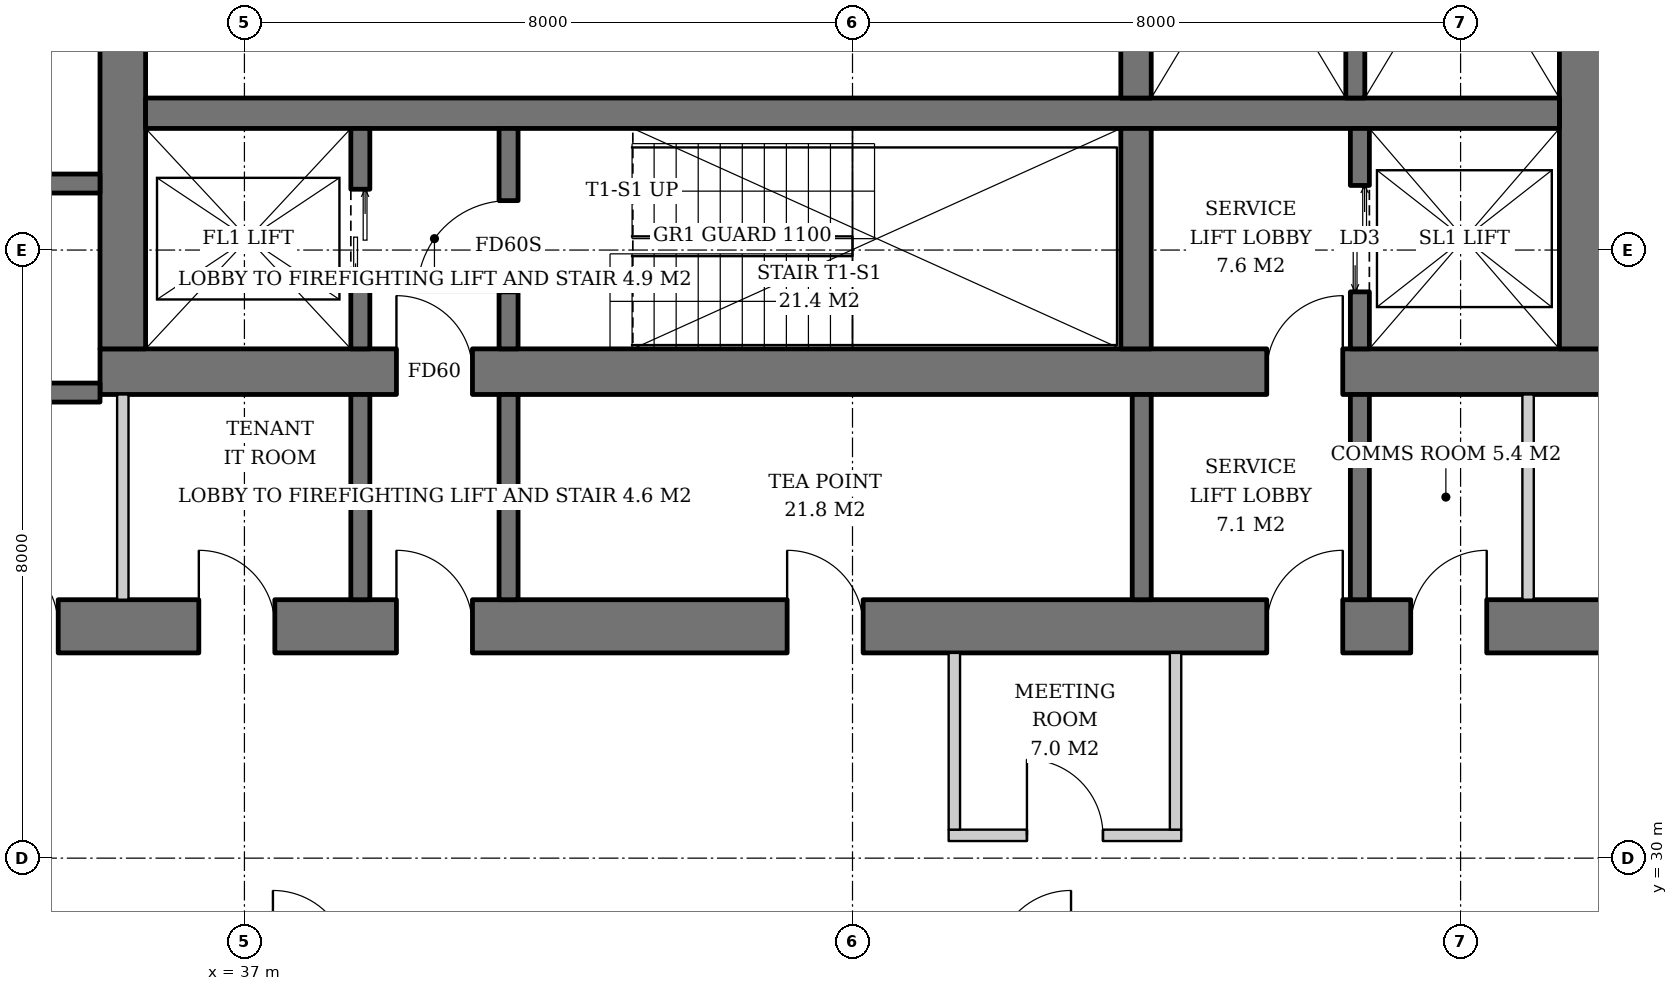
"""IFC4 building model, lengths in metres.
Left out: names, types, materials, properties, quantities, classifications, styles, units other than length and angle.
Written with IfcOpenShell. Run it as: python <this file> out.ifc"""

import sys

from ifc_helpers import new_model, si_unit, direction, frame, frame_2d, origin, place, context, subcontext, project, spatial, rectangle, extrude, element, fill, save


model = new_model("IFC4")
c1 = context("Model", 3, precision=1e-05, world=origin(), true_north=direction((0.0, 1.0)))
c2 = subcontext(c1, "Body", "Model", "MODEL_VIEW")
j1 = project(units=[si_unit("LENGTHUNIT", "METRE"), si_unit("PLANEANGLEUNIT", "RADIAN")], contexts=[c1])
p1 = place(None, origin())
s1 = spatial("IfcSite", under=j1, at=p1, CompositionType="ELEMENT")
p2 = place(p1, origin())
s2 = spatial("IfcBuilding", under=s1, at=p2, CompositionType="ELEMENT")
p3 = place(p2, frame((0.0, 0.0, 112.2)))
s3 = spatial("IfcBuildingStorey", under=s2, at=p3, CompositionType="ELEMENT", Elevation=112.2)
p4 = place(p3, frame((35.1, 36.4, 0.0), z_axis=(0.0, 0.0, 1.0), x_axis=(1.0, 0.0, 0.0)))
e1 = element("IfcWall", 1, at=p4, inside=s3, PredefinedType="SHEAR", context=c2, shape_type="SweptSolid", body=[
    extrude(rectangle(XDim=19.8, YDim=0.6, at=frame_2d((9.9, 0.0))), origin(), (0.0, 0.0, 1.0), 3.8),
])
p5 = place(p4, frame((3.9, 0.0, 0.0)))
e2 = element("IfcOpeningElement", 2, at=p5, cuts=e1, PredefinedType="OPENING", context=c2, shape_type="SweptSolid", body=[
    extrude(rectangle(XDim=1.0, YDim=2.1, at=frame_2d((0.5, 1.05))), frame((0.0, 0.31, 0.0), z_axis=(0.0, -1.0, 0.0), x_axis=(1.0, 0.0, 0.0)), (0.0, 0.0, 1.0), 0.62),
])
p6 = place(p4, frame((15.35, 0.0, 0.0)))
e3 = element("IfcOpeningElement", 3, at=p6, cuts=e1, PredefinedType="OPENING", context=c2, shape_type="SweptSolid", body=[
    extrude(rectangle(XDim=1.0, YDim=2.1, at=frame_2d((0.5, 1.05))), frame((0.0, 0.31, 0.0), z_axis=(0.0, -1.0, 0.0), x_axis=(1.0, 0.0, 0.0)), (0.0, 0.0, 1.0), 0.62),
])
p7 = place(p3, frame((35.4, 36.7, 0.0), z_axis=(0.0, 0.0, 1.0), x_axis=(0.0, 1.0, 0.0)))
e4 = element("IfcWall", 4, at=p7, inside=s3, PredefinedType="SHEAR", context=c2, shape_type="SweptSolid", body=[
    extrude(rectangle(XDim=18.6, YDim=0.6, at=frame_2d((9.3, 0.0))), origin(), (0.0, 0.0, 1.0), 3.8),
])
p8 = place(p7, frame((8.4, 0.0, 0.0)))
e5 = element("IfcOpeningElement", 5, at=p8, cuts=e4, PredefinedType="OPENING", context=c2, shape_type="SweptSolid", body=[
    extrude(rectangle(XDim=1.8, YDim=2.4, at=frame_2d((0.9, 1.2))), frame((0.0, 0.31, 0.0), z_axis=(0.0, -1.0, 0.0), x_axis=(1.0, 0.0, 0.0)), (0.0, 0.0, 1.0), 0.62),
])
p9 = place(p3, frame((54.6, 36.7, 0.0), z_axis=(0.0, 0.0, 1.0), x_axis=(0.0, 1.0, 0.0)))
e6 = element("IfcWall", 6, at=p9, inside=s3, PredefinedType="SHEAR", context=c2, shape_type="SweptSolid", body=[
    extrude(rectangle(XDim=18.6, YDim=0.6, at=frame_2d((9.3, 0.0))), origin(), (0.0, 0.0, 1.0), 3.8),
])
p10 = place(p9, frame((8.4, 0.0, 0.0)))
e7 = element("IfcOpeningElement", 7, at=p10, cuts=e6, PredefinedType="OPENING", context=c2, shape_type="SweptSolid", body=[
    extrude(rectangle(XDim=1.8, YDim=2.4, at=frame_2d((0.9, 1.2))), frame((0.0, 0.31, 0.0), z_axis=(0.0, -1.0, 0.0), x_axis=(1.0, 0.0, 0.0)), (0.0, 0.0, 1.0), 0.62),
])
p11 = place(p3, frame((31.7, 33.05, 0.0), z_axis=(0.0, 0.0, 1.0), x_axis=(1.0, 0.0, 0.0)))
e8 = element("IfcWall", 8, at=p11, inside=s3, PredefinedType="SHEAR", context=c2, shape_type="SweptSolid", body=[
    extrude(rectangle(XDim=26.6, YDim=0.7, at=frame_2d((13.3, 0.0))), origin(), (0.0, 0.0, 1.0), 3.8),
])
p12 = place(p11, frame((7.3, 0.0, 0.0)))
e9 = element("IfcOpeningElement", 9, at=p12, cuts=e8, PredefinedType="OPENING", context=c2, shape_type="SweptSolid", body=[
    extrude(rectangle(XDim=1.0, YDim=2.1, at=frame_2d((0.5, 1.05))), frame((0.0, 0.36, 0.0), z_axis=(0.0, -1.0, 0.0), x_axis=(1.0, 0.0, 0.0)), (0.0, 0.0, 1.0), 0.72),
])
p13 = place(p11, frame((18.75, 0.0, 0.0)))
e10 = element("IfcOpeningElement", 10, at=p13, cuts=e8, PredefinedType="OPENING", context=c2, shape_type="SweptSolid", body=[
    extrude(rectangle(XDim=1.0, YDim=2.1, at=frame_2d((0.5, 1.05))), frame((0.0, 0.36, 0.0), z_axis=(0.0, -1.0, 0.0), x_axis=(1.0, 0.0, 0.0)), (0.0, 0.0, 1.0), 0.72),
])
p14 = place(p11, frame((1.85, 0.0, 0.0)))
e11 = element("IfcOpeningElement", 11, at=p14, cuts=e8, PredefinedType="OPENING", context=c2, shape_type="SweptSolid", body=[
    extrude(rectangle(XDim=1.0, YDim=2.1, at=frame_2d((0.5, 1.05))), frame((0.0, 0.36, 0.0), z_axis=(0.0, -1.0, 0.0), x_axis=(1.0, 0.0, 0.0)), (0.0, 0.0, 1.0), 0.72),
])
p15 = place(p11, frame((4.7, 0.0, 0.0)))
e12 = element("IfcOpeningElement", 12, at=p15, cuts=e8, PredefinedType="OPENING", context=c2, shape_type="SweptSolid", body=[
    extrude(rectangle(XDim=1.0, YDim=2.1, at=frame_2d((0.5, 1.05))), frame((0.0, 0.36, 0.0), z_axis=(0.0, -1.0, 0.0), x_axis=(1.0, 0.0, 0.0)), (0.0, 0.0, 1.0), 0.72),
])
p16 = place(p11, frame((12.44, 0.0, 0.0)))
e13 = element("IfcOpeningElement", 13, at=p16, cuts=e8, PredefinedType="OPENING", context=c2, shape_type="SweptSolid", body=[
    extrude(rectangle(XDim=1.0, YDim=2.1, at=frame_2d((0.5, 1.05))), frame((0.0, 0.36, 0.0), z_axis=(0.0, -1.0, 0.0), x_axis=(1.0, 0.0, 0.0)), (0.0, 0.0, 1.0), 0.72),
])
p17 = place(p11, frame((20.644, 0.0, 0.0)))
e14 = element("IfcOpeningElement", 14, at=p17, cuts=e8, PredefinedType="OPENING", context=c2, shape_type="SweptSolid", body=[
    extrude(rectangle(XDim=1.0, YDim=2.1, at=frame_2d((0.5, 1.05))), frame((0.0, 0.36, 0.0), z_axis=(0.0, -1.0, 0.0), x_axis=(1.0, 0.0, 0.0)), (0.0, 0.0, 1.0), 0.72),
])
p18 = place(p11, frame((23.544, 0.0, 0.0)))
e15 = element("IfcOpeningElement", 15, at=p18, cuts=e8, PredefinedType="OPENING", context=c2, shape_type="SweptSolid", body=[
    extrude(rectangle(XDim=1.0, YDim=2.1, at=frame_2d((0.5, 1.05))), frame((0.0, 0.36, 0.0), z_axis=(0.0, -1.0, 0.0), x_axis=(1.0, 0.0, 0.0)), (0.0, 0.0, 1.0), 0.72),
])
p19 = place(p3, frame((35.7, 39.8, 0.0), z_axis=(0.0, 0.0, 1.0), x_axis=(1.0, 0.0, 0.0)))
e16 = element("IfcWall", 16, at=p19, inside=s3, PredefinedType="SHEAR", context=c2, shape_type="SweptSolid", body=[
    extrude(rectangle(XDim=18.6, YDim=0.4, at=frame_2d((9.3, 0.0))), origin(), (0.0, 0.0, 1.0), 3.8),
])
p20 = place(p3, frame((48.73, 36.7, 0.0), z_axis=(0.0, 0.0, 1.0), x_axis=(0.0, 1.0, 0.0)))
e17 = element("IfcWall", 17, at=p20, inside=s3, PredefinedType="SHEAR", context=c2, shape_type="SweptSolid", body=[
    extrude(rectangle(XDim=2.9, YDim=0.4, at=frame_2d((1.45, 0.0))), origin(), (0.0, 0.0, 1.0), 3.8),
])
p21 = place(p3, frame((48.73, 40.0, 0.0), z_axis=(0.0, 0.0, 1.0), x_axis=(0.0, 1.0, 0.0)))
e18 = element("IfcWall", 18, at=p21, inside=s3, PredefinedType="SHEAR", context=c2, shape_type="SweptSolid", body=[
    extrude(rectangle(XDim=12.0, YDim=0.4, at=frame_2d((6.0, 0.0))), origin(), (0.0, 0.0, 1.0), 3.8),
])
p22 = place(p3, frame((38.525, 36.7, 0.0), z_axis=(0.0, 0.0, 1.0), x_axis=(0.0, 1.0, 0.0)))
e19 = element("IfcWall", 19, at=p22, inside=s3, PredefinedType="SHEAR", context=c2, shape_type="SweptSolid", body=[
    extrude(rectangle(XDim=2.9, YDim=0.25, at=frame_2d((1.45, 0.0))), origin(), (0.0, 0.0, 1.0), 3.8),
])
p23 = place(p22, frame((0.8, 0.0, 0.0)))
e20 = element("IfcOpeningElement", 20, at=p23, cuts=e19, PredefinedType="OPENING", context=c2, shape_type="SweptSolid", body=[
    extrude(rectangle(XDim=1.3, YDim=2.2, at=frame_2d((0.65, 1.1))), frame((0.0, 0.135, 0.0), z_axis=(0.0, -1.0, 0.0), x_axis=(1.0, 0.0, 0.0)), (0.0, 0.0, 1.0), 0.27),
])
p24 = place(p3, frame((40.475, 36.7, 0.0), z_axis=(0.0, 0.0, 1.0), x_axis=(0.0, 1.0, 0.0)))
e21 = element("IfcWall", 21, at=p24, inside=s3, PredefinedType="SHEAR", context=c2, shape_type="SweptSolid", body=[
    extrude(rectangle(XDim=2.9, YDim=0.25, at=frame_2d((1.45, 0.0))), origin(), (0.0, 0.0, 1.0), 3.8),
])
p25 = place(p24, frame((0.75, 0.0, 0.0)))
e22 = element("IfcOpeningElement", 22, at=p25, cuts=e21, PredefinedType="OPENING", context=c2, shape_type="SweptSolid", body=[
    extrude(rectangle(XDim=1.2, YDim=2.1, at=frame_2d((0.6, 1.05))), frame((0.0, 0.135, 0.0), z_axis=(0.0, -1.0, 0.0), x_axis=(1.0, 0.0, 0.0)), (0.0, 0.0, 1.0), 0.27),
])
p26 = place(p3, frame((51.675, 36.7, 0.0), z_axis=(0.0, 0.0, 1.0), x_axis=(0.0, 1.0, 0.0)))
e23 = element("IfcWall", 23, at=p26, inside=s3, PredefinedType="SHEAR", context=c2, shape_type="SweptSolid", body=[
    extrude(rectangle(XDim=2.9, YDim=0.25, at=frame_2d((1.45, 0.0))), origin(), (0.0, 0.0, 1.0), 3.8),
])
p27 = place(p26, frame((0.75, 0.0, 0.0)))
e24 = element("IfcOpeningElement", 24, at=p27, cuts=e23, PredefinedType="OPENING", context=c2, shape_type="SweptSolid", body=[
    extrude(rectangle(XDim=1.4, YDim=2.4, at=frame_2d((0.7, 1.2))), frame((0.0, 0.135, 0.0), z_axis=(0.0, -1.0, 0.0), x_axis=(1.0, 0.0, 0.0)), (0.0, 0.0, 1.0), 0.27),
])
p28 = place(p3, frame((51.615, 44.25, 0.0), z_axis=(0.0, 0.0, 1.0), x_axis=(0.0, -1.0, 0.0)))
e25 = element("IfcWall", 25, at=p28, inside=s3, PredefinedType="SHEAR", context=c2, shape_type="SweptSolid", body=[
    extrude(rectangle(XDim=4.25, YDim=0.25, at=frame_2d((2.125, 0.0))), origin(), (0.0, 0.0, 1.0), 3.8),
])
for number, where, z_axis, x_axis in (
    (26, (32.4, 36.125, 0.0), (0.0, 0.0, 1.0), (1.0, 0.0, 0.0)),
    (27, (32.4, 38.875, 0.0), (0.0, 0.0, 1.0), (1.0, 0.0, 0.0)),
):
    element("IfcWall", number, at=place(p3, frame(where, z_axis=z_axis, x_axis=x_axis)), inside=s3, PredefinedType="SHEAR", context=c2, shape_type="SweptSolid", body=[
        extrude(rectangle(XDim=2.7, YDim=0.25, at=frame_2d((1.35, 0.0))), origin(), (0.0, 0.0, 1.0), 3.8),
    ])
for number, where, z_axis, x_axis in (
    (28, (38.525, 33.4, 0.0), (0.0, 0.0, 1.0), (0.0, 1.0, 0.0)),
    (29, (40.475, 33.4, 0.0), (0.0, 0.0, 1.0), (0.0, 1.0, 0.0)),
    (30, (48.805, 33.4, 0.0), (0.0, 0.0, 1.0), (0.0, 1.0, 0.0)),
    (31, (51.675, 33.4, 0.0), (0.0, 0.0, 1.0), (0.0, 1.0, 0.0)),
):
    element("IfcWall", number, at=place(p3, frame(where, z_axis=z_axis, x_axis=x_axis)), inside=s3, PredefinedType="SOLIDWALL", context=c2, shape_type="SweptSolid", body=[
        extrude(rectangle(XDim=2.7, YDim=0.25, at=frame_2d((1.35, 0.0))), origin(), (0.0, 0.0, 1.0), 3.62),
    ])
for number, where, z_axis, x_axis in (
    (32, (35.4, 33.4, 0.0), (0.0, 0.0, 1.0), (0.0, 1.0, 0.0)),
    (33, (53.888, 33.4, 0.0), (0.0, 0.0, 1.0), (0.0, 1.0, 0.0)),
):
    element("IfcWall", number, at=place(p3, frame(where, z_axis=z_axis, x_axis=x_axis)), inside=s3, PredefinedType="SOLIDWALL", context=c2, shape_type="SweptSolid", body=[
        extrude(rectangle(XDim=2.7, YDim=0.15, at=frame_2d((1.35, 0.0))), origin(), (0.0, 0.0, 1.0), 3.62),
    ])
p29 = place(p3, frame((46.265, 30.3, 0.0), z_axis=(0.0, 0.0, 1.0), x_axis=(1.0, 0.0, 0.0)))
e34 = element("IfcWall", 34, at=p29, inside=s3, PredefinedType="PARTITIONING", context=c2, shape_type="SweptSolid", body=[
    extrude(rectangle(XDim=3.06, YDim=0.15, at=frame_2d((1.53, 0.0))), origin(), (0.0, 0.0, 1.0), 2.858),
])
p30 = place(p29, frame((1.03, 0.0, 0.0)))
e35 = element("IfcOpeningElement", 35, at=p30, cuts=e34, PredefinedType="OPENING", context=c2, shape_type="SweptSolid", body=[
    extrude(rectangle(XDim=1.0, YDim=2.1, at=frame_2d((0.5, 1.05))), frame((0.0, 0.085, 0.0), z_axis=(0.0, -1.0, 0.0), x_axis=(1.0, 0.0, 0.0)), (0.0, 0.0, 1.0), 0.17),
])
for number, where, z_axis, x_axis in (
    (36, (46.34, 32.7, 0.0), (0.0, 0.0, 1.0), (0.0, -1.0, 0.0)),
    (37, (49.25, 32.7, 0.0), (0.0, 0.0, 1.0), (0.0, -1.0, 0.0)),
):
    element("IfcWall", number, at=place(p3, frame(where, z_axis=z_axis, x_axis=x_axis)), inside=s3, PredefinedType="PARTITIONING", context=c2, shape_type="SweptSolid", body=[
        extrude(rectangle(XDim=2.325, YDim=0.15, at=frame_2d((1.163, 0.0))), origin(), (0.0, 0.0, 1.0), 3.62),
    ])
p31 = place(p23, origin())
e38 = element("IfcDoor", 38, at=p31, inside=s3, OperationType="DOUBLE_DOOR_SLIDING", PredefinedType="DOOR", context=c2, shape_type="SweptSolid", body=[
    extrude(rectangle(XDim=1.3, YDim=2.2, at=frame_2d((0.65, 1.1))), frame((0.0, 0.025, 0.0), z_axis=(0.0, -1.0, 0.0), x_axis=(1.0, 0.0, 0.0)), (0.0, 0.0, 1.0), 0.05),
])
fill(e20, e38)
p32 = place(p25, origin())
e39 = element("IfcDoor", 39, at=p32, inside=s3, OperationType="SINGLE_SWING_LEFT", PredefinedType="DOOR", context=c2, shape_type="SweptSolid", body=[
    extrude(rectangle(XDim=1.2, YDim=2.1, at=frame_2d((0.6, 1.05))), frame((0.0, 0.025, 0.0), z_axis=(0.0, -1.0, 0.0), x_axis=(1.0, 0.0, 0.0)), (0.0, 0.0, 1.0), 0.05),
])
fill(e22, e39)
p33 = place(p27, origin())
e40 = element("IfcDoor", 40, at=p33, inside=s3, OperationType="DOUBLE_DOOR_SLIDING", PredefinedType="DOOR", context=c2, shape_type="SweptSolid", body=[
    extrude(rectangle(XDim=1.4, YDim=2.4, at=frame_2d((0.7, 1.2))), frame((0.0, 0.025, 0.0), z_axis=(0.0, -1.0, 0.0), x_axis=(1.0, 0.0, 0.0)), (0.0, 0.0, 1.0), 0.05),
])
fill(e24, e40)
p34 = place(p5, origin())
e41 = element("IfcDoor", 41, at=p34, inside=s3, OperationType="SINGLE_SWING_LEFT", PredefinedType="DOOR", context=c2, shape_type="SweptSolid", body=[
    extrude(rectangle(XDim=1.0, YDim=2.1, at=frame_2d((0.5, 1.05))), frame((0.0, 0.025, 0.0), z_axis=(0.0, -1.0, 0.0), x_axis=(1.0, 0.0, 0.0)), (0.0, 0.0, 1.0), 0.05),
])
fill(e2, e41)
p35 = place(p6, origin())
e42 = element("IfcDoor", 42, at=p35, inside=s3, OperationType="SINGLE_SWING_RIGHT", PredefinedType="DOOR", context=c2, shape_type="SweptSolid", body=[
    extrude(rectangle(XDim=1.0, YDim=2.1, at=frame_2d((0.5, 1.05))), frame((0.0, 0.025, 0.0), z_axis=(0.0, -1.0, 0.0), x_axis=(1.0, 0.0, 0.0)), (0.0, 0.0, 1.0), 0.05),
])
fill(e3, e42)
p36 = place(p12, origin())
e43 = element("IfcDoor", 43, at=p36, inside=s3, OperationType="SINGLE_SWING_LEFT", PredefinedType="DOOR", context=c2, shape_type="SweptSolid", body=[
    extrude(rectangle(XDim=1.0, YDim=2.1, at=frame_2d((0.5, 1.05))), frame((0.0, 0.025, 0.0), z_axis=(0.0, -1.0, 0.0), x_axis=(1.0, 0.0, 0.0)), (0.0, 0.0, 1.0), 0.05),
])
fill(e9, e43)
p37 = place(p13, origin())
e44 = element("IfcDoor", 44, at=p37, inside=s3, OperationType="SINGLE_SWING_RIGHT", PredefinedType="DOOR", context=c2, shape_type="SweptSolid", body=[
    extrude(rectangle(XDim=1.0, YDim=2.1, at=frame_2d((0.5, 1.05))), frame((0.0, 0.025, 0.0), z_axis=(0.0, -1.0, 0.0), x_axis=(1.0, 0.0, 0.0)), (0.0, 0.0, 1.0), 0.05),
])
fill(e10, e44)
p38 = place(p14, origin())
e45 = element("IfcDoor", 45, at=p38, inside=s3, OperationType="SINGLE_SWING_LEFT", PredefinedType="DOOR", context=c2, shape_type="SweptSolid", body=[
    extrude(rectangle(XDim=1.0, YDim=2.1, at=frame_2d((0.5, 1.05))), frame((0.0, 0.34, 0.0), z_axis=(0.0, -1.0, 0.0), x_axis=(1.0, 0.0, 0.0)), (0.0, 0.0, 1.0), 0.05),
])
fill(e11, e45)
p39 = place(p15, origin())
e46 = element("IfcDoor", 46, at=p39, inside=s3, OperationType="SINGLE_SWING_LEFT", PredefinedType="DOOR", context=c2, shape_type="SweptSolid", body=[
    extrude(rectangle(XDim=1.0, YDim=2.1, at=frame_2d((0.5, 1.05))), frame((0.0, 0.34, 0.0), z_axis=(0.0, -1.0, 0.0), x_axis=(1.0, 0.0, 0.0)), (0.0, 0.0, 1.0), 0.05),
])
fill(e12, e46)
p40 = place(p16, origin())
e47 = element("IfcDoor", 47, at=p40, inside=s3, OperationType="SINGLE_SWING_LEFT", PredefinedType="DOOR", context=c2, shape_type="SweptSolid", body=[
    extrude(rectangle(XDim=1.0, YDim=2.1, at=frame_2d((0.5, 1.05))), frame((0.0, 0.34, 0.0), z_axis=(0.0, -1.0, 0.0), x_axis=(1.0, 0.0, 0.0)), (0.0, 0.0, 1.0), 0.05),
])
fill(e13, e47)
p41 = place(p17, origin())
e48 = element("IfcDoor", 48, at=p41, inside=s3, OperationType="SINGLE_SWING_RIGHT", PredefinedType="DOOR", context=c2, shape_type="SweptSolid", body=[
    extrude(rectangle(XDim=1.0, YDim=2.1, at=frame_2d((0.5, 1.05))), frame((0.0, 0.34, 0.0), z_axis=(0.0, -1.0, 0.0), x_axis=(1.0, 0.0, 0.0)), (0.0, 0.0, 1.0), 0.05),
])
fill(e14, e48)
p42 = place(p30, origin())
e49 = element("IfcDoor", 49, at=p42, inside=s3, OperationType="SINGLE_SWING_LEFT", PredefinedType="DOOR", context=c2, shape_type="SweptSolid", body=[
    extrude(rectangle(XDim=1.0, YDim=2.1, at=frame_2d((0.5, 1.05))), frame((0.0, 0.025, 0.0), z_axis=(0.0, -1.0, 0.0), x_axis=(1.0, 0.0, 0.0)), (0.0, 0.0, 1.0), 0.05),
])
fill(e35, e49)
save(model, sys.argv[1])
